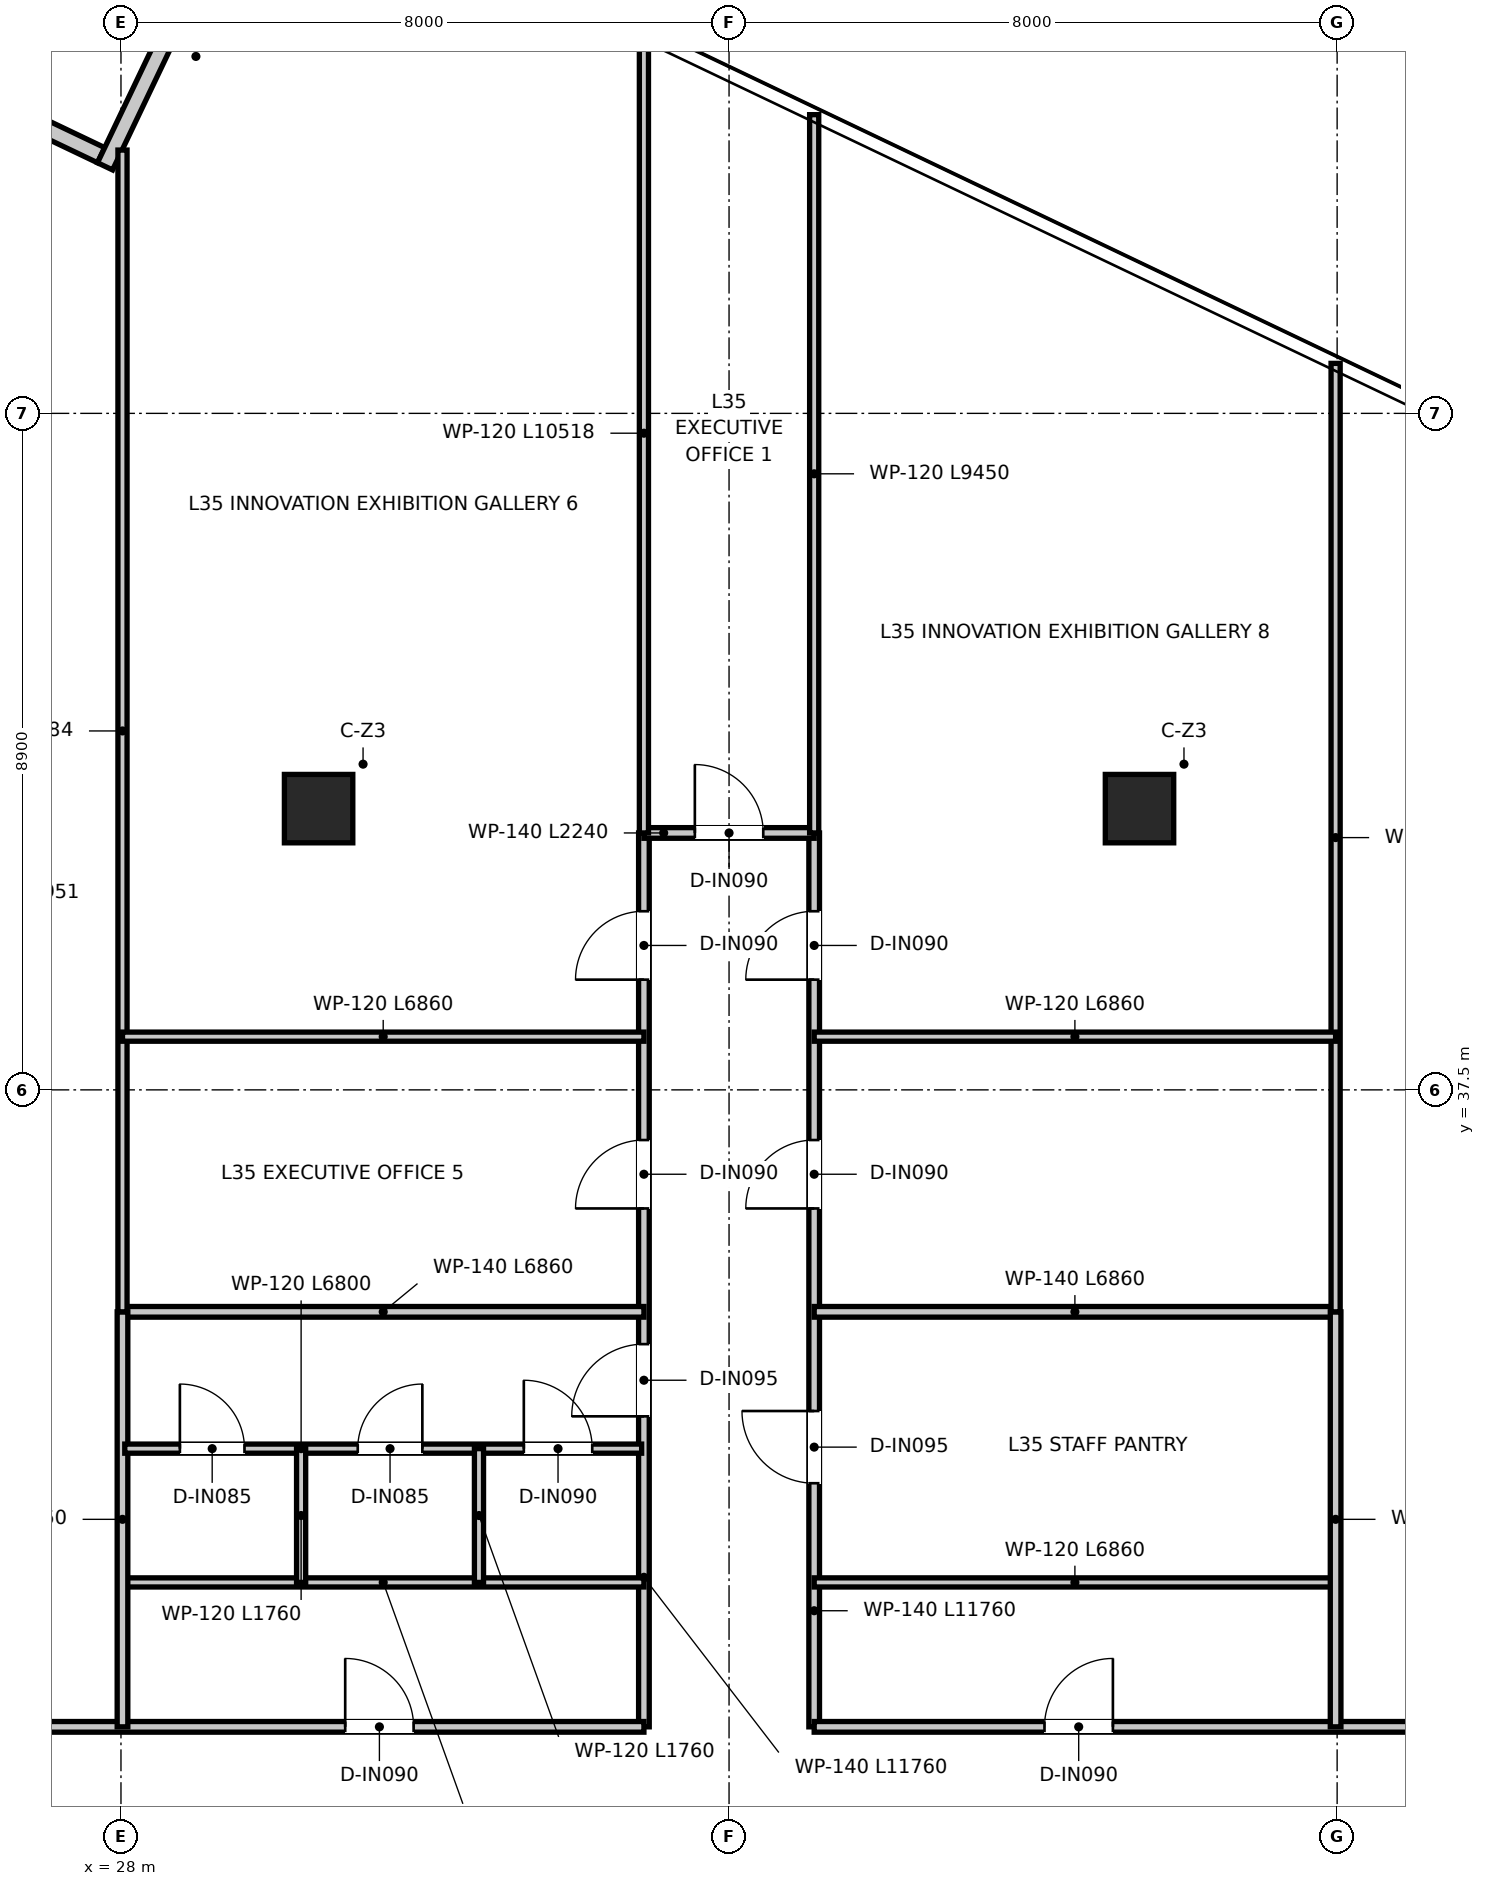
"""IFC4 building model, lengths in metres.
Left out: names, types, materials, properties, quantities, classifications, styles, units other than length and angle.
Written with IfcOpenShell. Run it as: python <this file> out.ifc"""

import sys

from ifc_helpers import new_model, si_unit, direction, frame, frame_2d, origin, origin_2d, place, context, subcontext, project, spatial, rectangle, extrude, source, transform, mapped, element, fill, save


model = new_model("IFC4")
c1 = context("Model", 3, precision=1e-05, world=origin(), true_north=direction((0.0, 1.0)))
c2 = subcontext(c1, "Body", "Model", "MODEL_VIEW")
j1 = project(units=[si_unit("LENGTHUNIT", "METRE"), si_unit("PLANEANGLEUNIT", "RADIAN")], contexts=[c1])
p1 = place(None, origin())
s1 = spatial("IfcSite", under=j1, at=p1, CompositionType="ELEMENT")
p2 = place(p1, origin())
s2 = spatial("IfcBuilding", under=s1, at=p2, CompositionType="ELEMENT")
p3 = place(p2, frame((0.0, 0.0, 146.2)))
s3 = spatial("IfcBuildingStorey", under=s2, at=p3, CompositionType="ELEMENT", Elevation=146.2)
m1 = source(origin(), c2, "Body", "SweptSolid", [
    extrude(rectangle(XDim=0.9, YDim=0.9, at=origin_2d()), origin(), (0.0, 0.0, 1.0), 3.95),
])
for number, where, z_axis, x_axis in (
    (1, (30.6, 41.2, 0.0), (0.0, 0.0, 1.0), (1.0, 0.0, 0.0)),
    (2, (41.4, 41.2, 0.0), (0.0, 0.0, 1.0), (1.0, 0.0, 0.0)),
):
    element("IfcColumn", number, at=place(p3, frame(where, z_axis=z_axis, x_axis=x_axis)), inside=s3, PredefinedType="COLUMN", context=c2, shape_type="MappedRepresentation", body=[
        mapped(m1, transform((0.0, 0.0, 0.0), x_axis=(1.0, 0.0, 0.0), y_axis=(0.0, 1.0, 0.0), z_axis=(0.0, 0.0, 1.0), scale=1.0)),
    ])
p4 = place(p3, frame((27.739, 49.797, 0.0), z_axis=(0.0, 0.0, 1.0), x_axis=(-0.902592070314, 0.43049686945, 0.0)))
e3 = element("IfcWall", 3, at=p4, inside=s3, PredefinedType="ELEMENTEDWALL", context=c2, shape_type="SweptSolid", body=[
    extrude(rectangle(XDim=4.525, YDim=0.22, at=frame_2d((2.262, 0.0))), origin(), (0.0, 0.0, 1.0), 3.67),
])
p5 = place(p3, frame((29.833, 53.933, 0.0), z_axis=(0.0, 0.0, 1.0), x_axis=(-0.430506704164, -0.902587379521, 0.0)))
e4 = element("IfcWall", 4, at=p5, inside=s3, PredefinedType="ELEMENTEDWALL", context=c2, shape_type="SweptSolid", body=[
    extrude(rectangle(XDim=4.745, YDim=0.22, at=frame_2d((2.373, 0.0))), origin(), (0.0, 0.0, 1.0), 3.67),
])
p6 = place(p3, frame((34.88, 29.12, 0.0), z_axis=(0.0, 0.0, 1.0), x_axis=(0.0, 1.0, 0.0)))
e5 = element("IfcWall", 5, at=p6, inside=s3, PredefinedType="PARTITIONING", context=c2, shape_type="SweptSolid", body=[
    extrude(rectangle(XDim=11.76, YDim=0.14, at=frame_2d((5.88, 0.0))), origin(), (0.0, 0.0, 1.0), 3.03),
])
p7 = place(p6, frame((4.085, 0.0, 0.0)))
e6 = element("IfcOpeningElement", 6, at=p7, cuts=e5, PredefinedType="OPENING", context=c2, shape_type="SweptSolid", body=[
    extrude(rectangle(XDim=0.95, YDim=2.1, at=frame_2d((0.475, 1.05))), frame((0.0, 0.08, 0.0), z_axis=(0.0, -1.0, 0.0), x_axis=(1.0, 0.0, 0.0)), (0.0, 0.0, 1.0), 0.16),
])
p8 = place(p6, frame((6.82, 0.0, 0.0)))
e7 = element("IfcOpeningElement", 7, at=p8, cuts=e5, PredefinedType="OPENING", context=c2, shape_type="SweptSolid", body=[
    extrude(rectangle(XDim=0.9, YDim=2.1, at=frame_2d((0.45, 1.05))), frame((0.0, 0.08, 0.0), z_axis=(0.0, -1.0, 0.0), x_axis=(1.0, 0.0, 0.0)), (0.0, 0.0, 1.0), 0.16),
])
p9 = place(p6, frame((9.83, 0.0, 0.0)))
e8 = element("IfcOpeningElement", 8, at=p9, cuts=e5, PredefinedType="OPENING", context=c2, shape_type="SweptSolid", body=[
    extrude(rectangle(XDim=0.9, YDim=2.1, at=frame_2d((0.45, 1.05))), frame((0.0, 0.08, 0.0), z_axis=(0.0, -1.0, 0.0), x_axis=(1.0, 0.0, 0.0)), (0.0, 0.0, 1.0), 0.16),
])
p10 = place(p3, frame((37.12, 29.12, 0.0), z_axis=(0.0, 0.0, 1.0), x_axis=(0.0, 1.0, 0.0)))
e9 = element("IfcWall", 9, at=p10, inside=s3, PredefinedType="PARTITIONING", context=c2, shape_type="SweptSolid", body=[
    extrude(rectangle(XDim=11.76, YDim=0.14, at=frame_2d((5.88, 0.0))), origin(), (0.0, 0.0, 1.0), 3.03),
])
p11 = place(p10, frame((3.205, 0.0, 0.0)))
e10 = element("IfcOpeningElement", 10, at=p11, cuts=e9, PredefinedType="OPENING", context=c2, shape_type="SweptSolid", body=[
    extrude(rectangle(XDim=0.95, YDim=2.1, at=frame_2d((0.475, 1.05))), frame((0.0, 0.08, 0.0), z_axis=(0.0, -1.0, 0.0), x_axis=(1.0, 0.0, 0.0)), (0.0, 0.0, 1.0), 0.16),
])
p12 = place(p10, frame((6.82, 0.0, 0.0)))
e11 = element("IfcOpeningElement", 11, at=p12, cuts=e9, PredefinedType="OPENING", context=c2, shape_type="SweptSolid", body=[
    extrude(rectangle(XDim=0.9, YDim=2.1, at=frame_2d((0.45, 1.05))), frame((0.0, 0.08, 0.0), z_axis=(0.0, -1.0, 0.0), x_axis=(1.0, 0.0, 0.0)), (0.0, 0.0, 1.0), 0.16),
])
p13 = place(p10, frame((9.83, 0.0, 0.0)))
e12 = element("IfcOpeningElement", 12, at=p13, cuts=e9, PredefinedType="OPENING", context=c2, shape_type="SweptSolid", body=[
    extrude(rectangle(XDim=0.9, YDim=2.1, at=frame_2d((0.45, 1.05))), frame((0.0, 0.08, 0.0), z_axis=(0.0, -1.0, 0.0), x_axis=(1.0, 0.0, 0.0)), (0.0, 0.0, 1.0), 0.16),
])
p14 = place(p3, frame((34.88, 40.88, 0.0), z_axis=(0.0, 0.0, 1.0), x_axis=(1.0, 0.0, 0.0)))
e13 = element("IfcWall", 13, at=p14, inside=s3, PredefinedType="PARTITIONING", context=c2, shape_type="SweptSolid", body=[
    extrude(rectangle(XDim=2.24, YDim=0.14, at=frame_2d((1.12, 0.0))), origin(), (0.0, 0.0, 1.0), 3.67),
])
p15 = place(p14, frame((0.67, 0.0, 0.0)))
e14 = element("IfcOpeningElement", 14, at=p15, cuts=e13, PredefinedType="OPENING", context=c2, shape_type="SweptSolid", body=[
    extrude(rectangle(XDim=0.9, YDim=2.1, at=frame_2d((0.45, 1.05))), frame((0.0, 0.08, 0.0), z_axis=(0.0, -1.0, 0.0), x_axis=(1.0, 0.0, 0.0)), (0.0, 0.0, 1.0), 0.16),
])
p16 = place(p3, frame((12.99, 29.12, 0.0), z_axis=(0.0, 0.0, 1.0), x_axis=(1.0, 0.0, 0.0)))
e15 = element("IfcWall", 15, at=p16, inside=s3, PredefinedType="PARTITIONING", context=c2, shape_type="SweptSolid", body=[
    extrude(rectangle(XDim=21.889, YDim=0.14, at=frame_2d((10.945, 0.0))), origin(), (0.0, 0.0, 1.0), 3.03),
])
p17 = place(p16, frame((17.96, 0.0, 0.0)))
e16 = element("IfcOpeningElement", 16, at=p17, cuts=e15, PredefinedType="OPENING", context=c2, shape_type="SweptSolid", body=[
    extrude(rectangle(XDim=0.9, YDim=2.1, at=frame_2d((0.45, 1.05))), frame((0.0, 0.08, 0.0), z_axis=(0.0, -1.0, 0.0), x_axis=(1.0, 0.0, 0.0)), (0.0, 0.0, 1.0), 0.16),
])
p18 = place(p16, frame((1.978, 0.0, 0.0)))
e17 = element("IfcOpeningElement", 17, at=p18, cuts=e15, PredefinedType="OPENING", context=c2, shape_type="SweptSolid", body=[
    extrude(rectangle(XDim=0.9, YDim=2.1, at=frame_2d((0.45, 1.05))), frame((0.0, 0.08, 0.0), z_axis=(0.0, -1.0, 0.0), x_axis=(1.0, 0.0, 0.0)), (0.0, 0.0, 1.0), 0.16),
])
p19 = place(p16, frame((9.46, 0.0, 0.0)))
e18 = element("IfcOpeningElement", 18, at=p19, cuts=e15, PredefinedType="OPENING", context=c2, shape_type="SweptSolid", body=[
    extrude(rectangle(XDim=0.9, YDim=2.1, at=frame_2d((0.45, 1.05))), frame((0.0, 0.08, 0.0), z_axis=(0.0, -1.0, 0.0), x_axis=(1.0, 0.0, 0.0)), (0.0, 0.0, 1.0), 0.16),
])
p20 = place(p16, frame((12.76, 0.0, 0.0)))
e19 = element("IfcOpeningElement", 19, at=p20, cuts=e15, PredefinedType="OPENING", context=c2, shape_type="SweptSolid", body=[
    extrude(rectangle(XDim=0.9, YDim=2.1, at=frame_2d((0.45, 1.05))), frame((0.0, 0.08, 0.0), z_axis=(0.0, -1.0, 0.0), x_axis=(1.0, 0.0, 0.0)), (0.0, 0.0, 1.0), 0.16),
])
p21 = place(p3, frame((37.12, 29.12, 0.0), z_axis=(0.0, 0.0, 1.0), x_axis=(1.0, 0.0, 0.0)))
e20 = element("IfcWall", 20, at=p21, inside=s3, PredefinedType="PARTITIONING", context=c2, shape_type="SweptSolid", body=[
    extrude(rectangle(XDim=24.198, YDim=0.14, at=frame_2d((12.099, 0.0))), origin(), (0.0, 0.0, 1.0), 3.03),
])
p22 = place(p21, frame((3.03, 0.0, 0.0)))
e21 = element("IfcOpeningElement", 21, at=p22, cuts=e20, PredefinedType="OPENING", context=c2, shape_type="SweptSolid", body=[
    extrude(rectangle(XDim=0.9, YDim=2.1, at=frame_2d((0.45, 1.05))), frame((0.0, 0.08, 0.0), z_axis=(0.0, -1.0, 0.0), x_axis=(1.0, 0.0, 0.0)), (0.0, 0.0, 1.0), 0.16),
])
p23 = place(p21, frame((8.67, 0.0, 0.0)))
e22 = element("IfcOpeningElement", 22, at=p23, cuts=e20, PredefinedType="OPENING", context=c2, shape_type="SweptSolid", body=[
    extrude(rectangle(XDim=0.9, YDim=2.1, at=frame_2d((0.45, 1.05))), frame((0.0, 0.08, 0.0), z_axis=(0.0, -1.0, 0.0), x_axis=(1.0, 0.0, 0.0)), (0.0, 0.0, 1.0), 0.16),
])
p24 = place(p21, frame((17.762, 0.0, 0.0)))
e23 = element("IfcOpeningElement", 23, at=p24, cuts=e20, PredefinedType="OPENING", context=c2, shape_type="SweptSolid", body=[
    extrude(rectangle(XDim=0.9, YDim=2.1, at=frame_2d((0.45, 1.05))), frame((0.0, 0.08, 0.0), z_axis=(0.0, -1.0, 0.0), x_axis=(1.0, 0.0, 0.0)), (0.0, 0.0, 1.0), 0.16),
])
for number, where, z_axis, x_axis in (
    (24, (28.02, 31.02, 0.0), (0.0, 0.0, 1.0), (1.0, 0.0, 0.0)),
    (25, (37.12, 31.02, 0.0), (0.0, 0.0, 1.0), (1.0, 0.0, 0.0)),
):
    element("IfcWall", number, at=place(p3, frame(where, z_axis=z_axis, x_axis=x_axis)), inside=s3, PredefinedType="PARTITIONING", context=c2, shape_type="SweptSolid", body=[
        extrude(rectangle(XDim=6.86, YDim=0.12, at=frame_2d((3.43, 0.0))), origin(), (0.0, 0.0, 1.0), 3.08),
    ])
for number, where, z_axis, x_axis in (
    (26, (28.02, 34.58, 0.0), (0.0, 0.0, 1.0), (1.0, 0.0, 0.0)),
    (27, (37.12, 34.58, 0.0), (0.0, 0.0, 1.0), (1.0, 0.0, 0.0)),
):
    element("IfcWall", number, at=place(p3, frame(where, z_axis=z_axis, x_axis=x_axis)), inside=s3, PredefinedType="PARTITIONING", context=c2, shape_type="SweptSolid", body=[
        extrude(rectangle(XDim=6.86, YDim=0.14, at=frame_2d((3.43, 0.0))), origin(), (0.0, 0.0, 1.0), 3.08),
    ])
for number, where, z_axis, x_axis in (
    (28, (28.02, 29.12, 0.0), (0.0, 0.0, 1.0), (0.0, 1.0, 0.0)),
    (29, (43.98, 29.12, 0.0), (0.0, 0.0, 1.0), (0.0, 1.0, 0.0)),
):
    element("IfcWall", number, at=place(p3, frame(where, z_axis=z_axis, x_axis=x_axis)), inside=s3, PredefinedType="PARTITIONING", context=c2, shape_type="SweptSolid", body=[
        extrude(rectangle(XDim=5.46, YDim=0.14, at=frame_2d((2.73, 0.0))), origin(), (0.0, 0.0, 1.0), 3.31),
    ])
p25 = place(p3, frame((28.05, 32.78, 0.0), z_axis=(0.0, 0.0, 1.0), x_axis=(1.0, 0.0, 0.0)))
e30 = element("IfcWall", 30, at=p25, inside=s3, PredefinedType="PARTITIONING", context=c2, shape_type="SweptSolid", body=[
    extrude(rectangle(XDim=6.8, YDim=0.12, at=frame_2d((3.4, 0.0))), origin(), (0.0, 0.0, 1.0), 3.08),
])
p26 = place(p25, frame((0.725, 0.0, 0.0)))
e31 = element("IfcOpeningElement", 31, at=p26, cuts=e30, PredefinedType="OPENING", context=c2, shape_type="SweptSolid", body=[
    extrude(rectangle(XDim=0.85, YDim=2.1, at=frame_2d((0.425, 1.05))), frame((0.0, 0.07, 0.0), z_axis=(0.0, -1.0, 0.0), x_axis=(1.0, 0.0, 0.0)), (0.0, 0.0, 1.0), 0.14),
])
p27 = place(p25, frame((3.065, 0.0, 0.0)))
e32 = element("IfcOpeningElement", 32, at=p27, cuts=e30, PredefinedType="OPENING", context=c2, shape_type="SweptSolid", body=[
    extrude(rectangle(XDim=0.85, YDim=2.1, at=frame_2d((0.425, 1.05))), frame((0.0, 0.07, 0.0), z_axis=(0.0, -1.0, 0.0), x_axis=(1.0, 0.0, 0.0)), (0.0, 0.0, 1.0), 0.14),
])
p28 = place(p25, frame((5.25, 0.0, 0.0)))
e33 = element("IfcOpeningElement", 33, at=p28, cuts=e30, PredefinedType="OPENING", context=c2, shape_type="SweptSolid", body=[
    extrude(rectangle(XDim=0.9, YDim=2.1, at=frame_2d((0.45, 1.05))), frame((0.0, 0.07, 0.0), z_axis=(0.0, -1.0, 0.0), x_axis=(1.0, 0.0, 0.0)), (0.0, 0.0, 1.0), 0.14),
])
p29 = place(p3, frame((30.37, 31.02, 0.0), z_axis=(0.0, 0.0, 1.0), x_axis=(0.0, 1.0, 0.0)))
e34 = element("IfcWall", 34, at=p29, inside=s3, PredefinedType="PARTITIONING", context=c2, shape_type="SweptSolid", body=[
    extrude(rectangle(XDim=1.76, YDim=0.12, at=frame_2d((0.88, 0.0))), origin(), (0.0, 0.0, 1.0), 3.08),
])
p30 = place(p3, frame((32.71, 31.02, 0.0), z_axis=(0.0, 0.0, 1.0), x_axis=(0.0, 1.0, 0.0)))
e35 = element("IfcWall", 35, at=p30, inside=s3, PredefinedType="PARTITIONING", context=c2, shape_type="SweptSolid", body=[
    extrude(rectangle(XDim=1.76, YDim=0.12, at=frame_2d((0.88, 0.0))), origin(), (0.0, 0.0, 1.0), 3.67),
])
p31 = place(p3, frame((34.88, 40.88, 0.0), z_axis=(0.0, 0.0, 1.0), x_axis=(0.0, 1.0, 0.0)))
e36 = element("IfcWall", 36, at=p31, inside=s3, PredefinedType="PARTITIONING", context=c2, shape_type="SweptSolid", body=[
    extrude(rectangle(XDim=10.518, YDim=0.12, at=frame_2d((5.259, 0.0))), origin(), (0.0, 0.0, 1.0), 3.28),
])
p32 = place(p3, frame((37.12, 40.88, 0.0), z_axis=(0.0, 0.0, 1.0), x_axis=(0.0, 1.0, 0.0)))
e37 = element("IfcWall", 37, at=p32, inside=s3, PredefinedType="PARTITIONING", context=c2, shape_type="SweptSolid", body=[
    extrude(rectangle(XDim=9.45, YDim=0.12, at=frame_2d((4.725, 0.0))), origin(), (0.0, 0.0, 1.0), 3.28),
])
p33 = place(p3, frame((28.02, 34.58, 0.0), z_axis=(0.0, 0.0, 1.0), x_axis=(0.0, 1.0, 0.0)))
e38 = element("IfcWall", 38, at=p33, inside=s3, PredefinedType="PARTITIONING", context=c2, shape_type="SweptSolid", body=[
    extrude(rectangle(XDim=15.284, YDim=0.12, at=frame_2d((7.642, 0.0))), origin(), (0.0, 0.0, 1.0), 3.03),
])
p34 = place(p3, frame((43.98, 34.58, 0.0), z_axis=(0.0, 0.0, 1.0), x_axis=(0.0, 1.0, 0.0)))
e39 = element("IfcWall", 39, at=p34, inside=s3, PredefinedType="PARTITIONING", context=c2, shape_type="SweptSolid", body=[
    extrude(rectangle(XDim=12.478, YDim=0.12, at=frame_2d((6.239, 0.0))), origin(), (0.0, 0.0, 1.0), 3.03),
])
for number, where, z_axis, x_axis in (
    (40, (28.02, 38.2, 0.0), (0.0, 0.0, 1.0), (1.0, 0.0, 0.0)),
    (41, (37.12, 38.2, 0.0), (0.0, 0.0, 1.0), (1.0, 0.0, 0.0)),
):
    element("IfcWall", number, at=place(p3, frame(where, z_axis=z_axis, x_axis=x_axis)), inside=s3, PredefinedType="PARTITIONING", context=c2, shape_type="SweptSolid", body=[
        extrude(rectangle(XDim=6.86, YDim=0.12, at=frame_2d((3.43, 0.0))), origin(), (0.0, 0.0, 1.0), 3.08),
    ])
p35 = place(p17, origin())
e42 = element("IfcDoor", 42, at=p35, inside=s3, OperationType="SINGLE_SWING_LEFT", PredefinedType="DOOR", context=c2, shape_type="SweptSolid", body=[
    extrude(rectangle(XDim=0.9, YDim=2.1, at=frame_2d((0.45, 1.05))), frame((0.0, 0.025, 0.0), z_axis=(0.0, -1.0, 0.0), x_axis=(1.0, 0.0, 0.0)), (0.0, 0.0, 1.0), 0.05),
])
fill(e16, e42)
p36 = place(p22, origin())
e43 = element("IfcDoor", 43, at=p36, inside=s3, OperationType="SINGLE_SWING_RIGHT", PredefinedType="DOOR", context=c2, shape_type="SweptSolid", body=[
    extrude(rectangle(XDim=0.9, YDim=2.1, at=frame_2d((0.45, 1.05))), frame((0.0, 0.025, 0.0), z_axis=(0.0, -1.0, 0.0), x_axis=(1.0, 0.0, 0.0)), (0.0, 0.0, 1.0), 0.05),
])
fill(e21, e43)
p37 = place(p7, origin())
e44 = element("IfcDoor", 44, at=p37, inside=s3, OperationType="SINGLE_SWING_LEFT", PredefinedType="DOOR", context=c2, shape_type="SweptSolid", body=[
    extrude(rectangle(XDim=0.95, YDim=2.1, at=frame_2d((0.475, 1.05))), frame((0.0, 0.025, 0.0), z_axis=(0.0, -1.0, 0.0), x_axis=(1.0, 0.0, 0.0)), (0.0, 0.0, 1.0), 0.05),
])
fill(e6, e44)
p38 = place(p11, origin())
e45 = element("IfcDoor", 45, at=p38, inside=s3, OperationType="SINGLE_SWING_RIGHT", PredefinedType="DOOR", context=c2, shape_type="SweptSolid", body=[
    extrude(rectangle(XDim=0.95, YDim=2.1, at=frame_2d((0.475, 1.05))), frame((0.0, 0.025, 0.0), z_axis=(0.0, -1.0, 0.0), x_axis=(1.0, 0.0, 0.0)), (0.0, 0.0, 1.0), 0.05),
])
fill(e10, e45)
p39 = place(p26, origin())
e46 = element("IfcDoor", 46, at=p39, inside=s3, OperationType="SINGLE_SWING_LEFT", PredefinedType="DOOR", context=c2, shape_type="SweptSolid", body=[
    extrude(rectangle(XDim=0.85, YDim=2.1, at=frame_2d((0.425, 1.05))), frame((0.0, 0.025, 0.0), z_axis=(0.0, -1.0, 0.0), x_axis=(1.0, 0.0, 0.0)), (0.0, 0.0, 1.0), 0.05),
])
fill(e31, e46)
p40 = place(p27, origin())
e47 = element("IfcDoor", 47, at=p40, inside=s3, OperationType="SINGLE_SWING_RIGHT", PredefinedType="DOOR", context=c2, shape_type="SweptSolid", body=[
    extrude(rectangle(XDim=0.85, YDim=2.1, at=frame_2d((0.425, 1.05))), frame((0.0, 0.025, 0.0), z_axis=(0.0, -1.0, 0.0), x_axis=(1.0, 0.0, 0.0)), (0.0, 0.0, 1.0), 0.05),
])
fill(e32, e47)
p41 = place(p28, origin())
e48 = element("IfcDoor", 48, at=p41, inside=s3, OperationType="SINGLE_SWING_LEFT", PredefinedType="DOOR", context=c2, shape_type="SweptSolid", body=[
    extrude(rectangle(XDim=0.9, YDim=2.1, at=frame_2d((0.45, 1.05))), frame((0.0, 0.025, 0.0), z_axis=(0.0, -1.0, 0.0), x_axis=(1.0, 0.0, 0.0)), (0.0, 0.0, 1.0), 0.05),
])
fill(e33, e48)
p42 = place(p15, origin())
e49 = element("IfcDoor", 49, at=p42, inside=s3, OperationType="SINGLE_SWING_LEFT", PredefinedType="DOOR", context=c2, shape_type="SweptSolid", body=[
    extrude(rectangle(XDim=0.9, YDim=2.1, at=frame_2d((0.45, 1.05))), frame((0.0, 0.025, 0.0), z_axis=(0.0, -1.0, 0.0), x_axis=(1.0, 0.0, 0.0)), (0.0, 0.0, 1.0), 0.05),
])
fill(e14, e49)
p43 = place(p8, origin())
e50 = element("IfcDoor", 50, at=p43, inside=s3, OperationType="SINGLE_SWING_LEFT", PredefinedType="DOOR", context=c2, shape_type="SweptSolid", body=[
    extrude(rectangle(XDim=0.9, YDim=2.1, at=frame_2d((0.45, 1.05))), frame((0.0, 0.025, 0.0), z_axis=(0.0, -1.0, 0.0), x_axis=(1.0, 0.0, 0.0)), (0.0, 0.0, 1.0), 0.05),
])
fill(e7, e50)
p44 = place(p9, origin())
e51 = element("IfcDoor", 51, at=p44, inside=s3, OperationType="SINGLE_SWING_LEFT", PredefinedType="DOOR", context=c2, shape_type="SweptSolid", body=[
    extrude(rectangle(XDim=0.9, YDim=2.1, at=frame_2d((0.45, 1.05))), frame((0.0, 0.025, 0.0), z_axis=(0.0, -1.0, 0.0), x_axis=(1.0, 0.0, 0.0)), (0.0, 0.0, 1.0), 0.05),
])
fill(e8, e51)
p45 = place(p12, origin())
e52 = element("IfcDoor", 52, at=p45, inside=s3, OperationType="SINGLE_SWING_LEFT", PredefinedType="DOOR", context=c2, shape_type="SweptSolid", body=[
    extrude(rectangle(XDim=0.9, YDim=2.1, at=frame_2d((0.45, 1.05))), frame((0.0, 0.025, 0.0), z_axis=(0.0, -1.0, 0.0), x_axis=(1.0, 0.0, 0.0)), (0.0, 0.0, 1.0), 0.05),
])
fill(e11, e52)
p46 = place(p13, origin())
e53 = element("IfcDoor", 53, at=p46, inside=s3, OperationType="SINGLE_SWING_LEFT", PredefinedType="DOOR", context=c2, shape_type="SweptSolid", body=[
    extrude(rectangle(XDim=0.9, YDim=2.1, at=frame_2d((0.45, 1.05))), frame((0.0, 0.025, 0.0), z_axis=(0.0, -1.0, 0.0), x_axis=(1.0, 0.0, 0.0)), (0.0, 0.0, 1.0), 0.05),
])
fill(e12, e53)
save(model, sys.argv[1])
